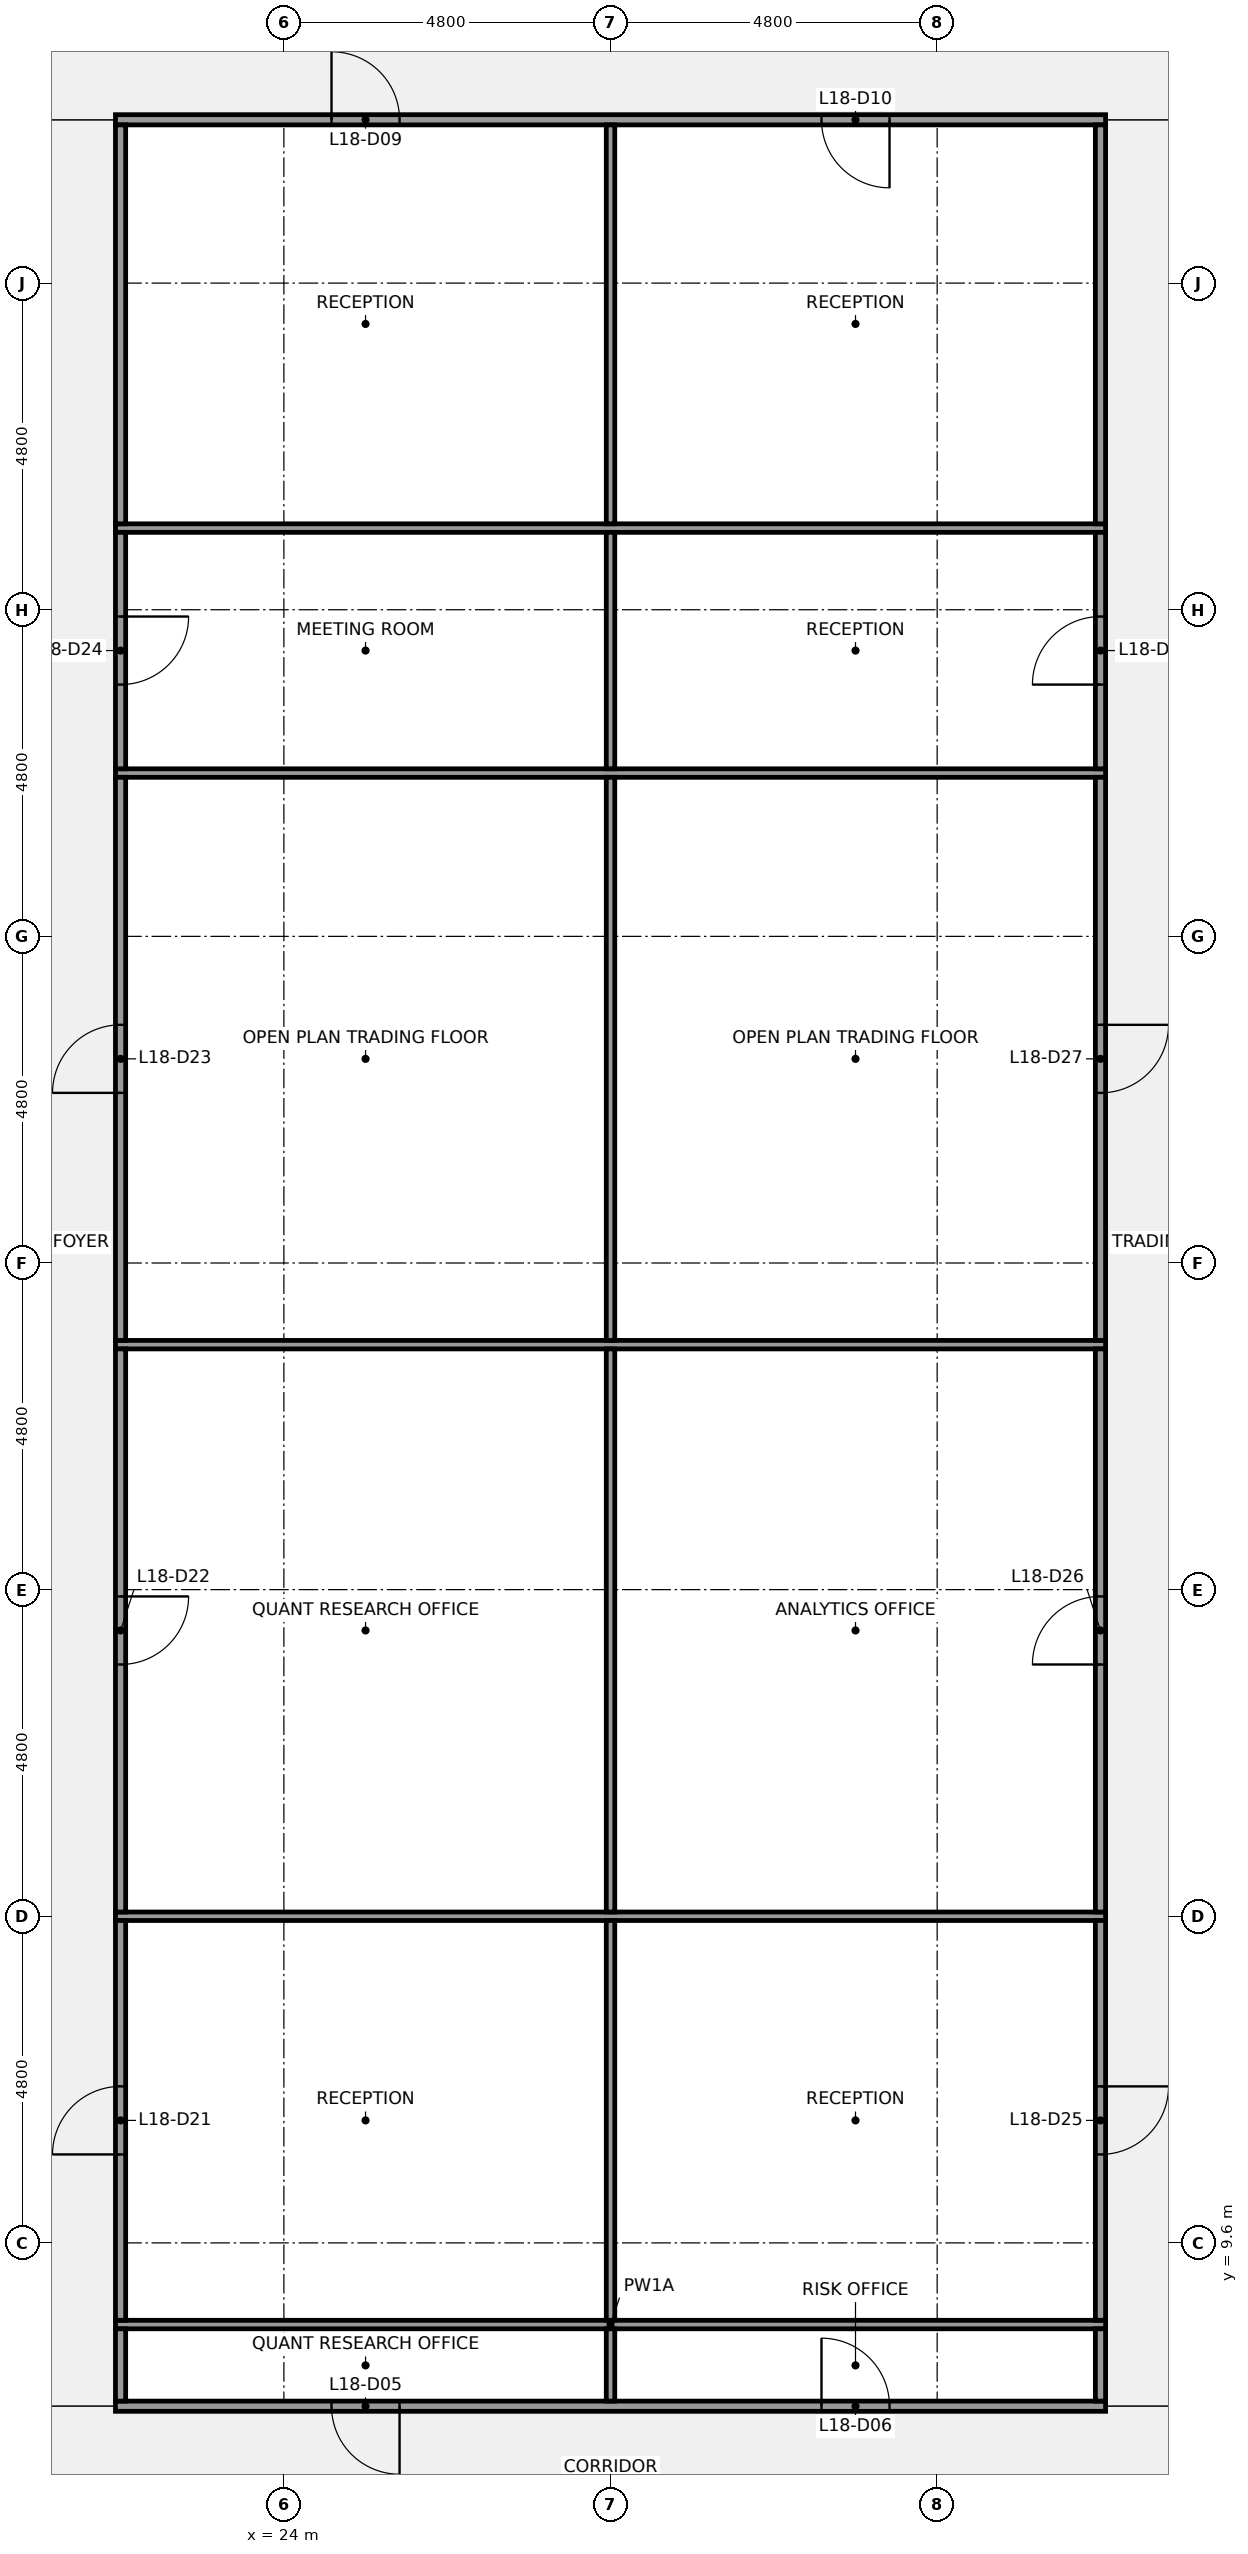
"""IFC4 building model, lengths in metres.
Left out: names, types, materials, properties, quantities, classifications, styles, units other than length and angle.
Written with IfcOpenShell. Run it as: python <this file> out.ifc"""

import sys

from ifc_helpers import new_model, si_unit, direction, frame, frame_2d, origin, place, context, subcontext, project, spatial, rectangle, extrude, element, fill, save


model = new_model("IFC4")
c1 = context("Model", 3, precision=1e-05, world=origin(), true_north=direction((0.0, 1.0)))
c2 = subcontext(c1, "Body", "Model", "MODEL_VIEW")
j1 = project(units=[si_unit("LENGTHUNIT", "METRE"), si_unit("PLANEANGLEUNIT", "RADIAN")], contexts=[c1])
p1 = place(None, origin())
s1 = spatial("IfcSite", under=j1, at=p1, CompositionType="ELEMENT")
p2 = place(p1, origin())
s2 = spatial("IfcBuilding", under=s1, at=p2, CompositionType="ELEMENT")
p3 = place(p2, frame((0.0, 0.0, 83.0)))
s3 = spatial("IfcBuildingStorey", under=s2, at=p3, CompositionType="ELEMENT", Elevation=83.0)
p4 = place(p3, frame((21.525, 7.2, 0.0), z_axis=(0.0, 0.0, 1.0), x_axis=(1.0, 0.0, 0.0)))
e1 = element("IfcWall", 1, at=p4, inside=s3, PredefinedType="PARTITIONING", context=c2, shape_type="SweptSolid", body=[
    extrude(rectangle(XDim=14.55, YDim=0.15, at=frame_2d((7.275, 0.0))), origin(), (0.0, 0.0, 1.0), 2.709),
])
p5 = place(p4, frame((3.175, 0.0, 0.0)))
e2 = element("IfcOpeningElement", 2, at=p5, cuts=e1, PredefinedType="OPENING", context=c2, shape_type="SweptSolid", body=[
    extrude(rectangle(XDim=1.0, YDim=2.1, at=frame_2d((0.5, 1.05))), frame((0.0, 0.085, 0.0), z_axis=(0.0, -1.0, 0.0), x_axis=(1.0, 0.0, 0.0)), (0.0, 0.0, 1.0), 0.17),
])
p6 = place(p4, frame((10.375, 0.0, 0.0)))
e3 = element("IfcOpeningElement", 3, at=p6, cuts=e1, PredefinedType="OPENING", context=c2, shape_type="SweptSolid", body=[
    extrude(rectangle(XDim=1.0, YDim=2.1, at=frame_2d((0.5, 1.05))), frame((0.0, 0.085, 0.0), z_axis=(0.0, -1.0, 0.0), x_axis=(1.0, 0.0, 0.0)), (0.0, 0.0, 1.0), 0.17),
])
for number, where, z_axis, x_axis in (
    (4, (21.525, 8.4, 0.0), (0.0, 0.0, 1.0), (1.0, 0.0, 0.0)),
    (5, (21.525, 14.4, 0.0), (0.0, 0.0, 1.0), (1.0, 0.0, 0.0)),
    (6, (21.525, 22.8, 0.0), (0.0, 0.0, 1.0), (1.0, 0.0, 0.0)),
    (7, (21.525, 31.2, 0.0), (0.0, 0.0, 1.0), (1.0, 0.0, 0.0)),
    (8, (21.525, 34.8, 0.0), (0.0, 0.0, 1.0), (1.0, 0.0, 0.0)),
):
    element("IfcWall", number, at=place(p3, frame(where, z_axis=z_axis, x_axis=x_axis)), inside=s3, PredefinedType="PARTITIONING", context=c2, shape_type="SweptSolid", body=[
        extrude(rectangle(XDim=14.55, YDim=0.125, at=frame_2d((7.275, 0.0))), origin(), (0.0, 0.0, 1.0), 2.709),
    ])
p7 = place(p3, frame((21.525, 40.8, 0.0), z_axis=(0.0, 0.0, 1.0), x_axis=(1.0, 0.0, 0.0)))
e9 = element("IfcWall", 9, at=p7, inside=s3, PredefinedType="PARTITIONING", context=c2, shape_type="SweptSolid", body=[
    extrude(rectangle(XDim=14.55, YDim=0.15, at=frame_2d((7.275, 0.0))), origin(), (0.0, 0.0, 1.0), 2.709),
])
p8 = place(p7, frame((3.175, 0.0, 0.0)))
e10 = element("IfcOpeningElement", 10, at=p8, cuts=e9, PredefinedType="OPENING", context=c2, shape_type="SweptSolid", body=[
    extrude(rectangle(XDim=1.0, YDim=2.1, at=frame_2d((0.5, 1.05))), frame((0.0, 0.085, 0.0), z_axis=(0.0, -1.0, 0.0), x_axis=(1.0, 0.0, 0.0)), (0.0, 0.0, 1.0), 0.17),
])
p9 = place(p7, frame((10.375, 0.0, 0.0)))
e11 = element("IfcOpeningElement", 11, at=p9, cuts=e9, PredefinedType="OPENING", context=c2, shape_type="SweptSolid", body=[
    extrude(rectangle(XDim=1.0, YDim=2.1, at=frame_2d((0.5, 1.05))), frame((0.0, 0.085, 0.0), z_axis=(0.0, -1.0, 0.0), x_axis=(1.0, 0.0, 0.0)), (0.0, 0.0, 1.0), 0.17),
])
p10 = place(p3, frame((21.6, 7.275, 0.0), z_axis=(0.0, 0.0, 1.0), x_axis=(0.0, 1.0, 0.0)))
e12 = element("IfcWall", 12, at=p10, inside=s3, PredefinedType="PARTITIONING", context=c2, shape_type="SweptSolid", body=[
    extrude(rectangle(XDim=1.062, YDim=0.15, at=frame_2d((0.531, 0.0))), origin(), (0.0, 0.0, 1.0), 2.709),
])
p11 = place(p3, frame((21.6, 8.462, 0.0), z_axis=(0.0, 0.0, 1.0), x_axis=(0.0, 1.0, 0.0)))
e13 = element("IfcWall", 13, at=p11, inside=s3, PredefinedType="PARTITIONING", context=c2, shape_type="SweptSolid", body=[
    extrude(rectangle(XDim=5.875, YDim=0.15, at=frame_2d((2.938, 0.0))), origin(), (0.0, 0.0, 1.0), 2.709),
])
p12 = place(p11, frame((2.438, 0.0, 0.0)))
e14 = element("IfcOpeningElement", 14, at=p12, cuts=e13, PredefinedType="OPENING", context=c2, shape_type="SweptSolid", body=[
    extrude(rectangle(XDim=1.0, YDim=2.1, at=frame_2d((0.5, 1.05))), frame((0.0, 0.085, 0.0), z_axis=(0.0, -1.0, 0.0), x_axis=(1.0, 0.0, 0.0)), (0.0, 0.0, 1.0), 0.17),
])
p13 = place(p3, frame((21.6, 14.462, 0.0), z_axis=(0.0, 0.0, 1.0), x_axis=(0.0, 1.0, 0.0)))
e15 = element("IfcWall", 15, at=p13, inside=s3, PredefinedType="PARTITIONING", context=c2, shape_type="SweptSolid", body=[
    extrude(rectangle(XDim=8.275, YDim=0.15, at=frame_2d((4.138, 0.0))), origin(), (0.0, 0.0, 1.0), 2.709),
])
p14 = place(p13, frame((3.637, 0.0, 0.0)))
e16 = element("IfcOpeningElement", 16, at=p14, cuts=e15, PredefinedType="OPENING", context=c2, shape_type="SweptSolid", body=[
    extrude(rectangle(XDim=1.0, YDim=2.1, at=frame_2d((0.5, 1.05))), frame((0.0, 0.085, 0.0), z_axis=(0.0, -1.0, 0.0), x_axis=(1.0, 0.0, 0.0)), (0.0, 0.0, 1.0), 0.17),
])
p15 = place(p3, frame((21.6, 22.863, 0.0), z_axis=(0.0, 0.0, 1.0), x_axis=(0.0, 1.0, 0.0)))
e17 = element("IfcWall", 17, at=p15, inside=s3, PredefinedType="PARTITIONING", context=c2, shape_type="SweptSolid", body=[
    extrude(rectangle(XDim=8.275, YDim=0.15, at=frame_2d((4.137, 0.0))), origin(), (0.0, 0.0, 1.0), 2.709),
])
p16 = place(p15, frame((3.637, 0.0, 0.0)))
e18 = element("IfcOpeningElement", 18, at=p16, cuts=e17, PredefinedType="OPENING", context=c2, shape_type="SweptSolid", body=[
    extrude(rectangle(XDim=1.0, YDim=2.1, at=frame_2d((0.5, 1.05))), frame((0.0, 0.085, 0.0), z_axis=(0.0, -1.0, 0.0), x_axis=(1.0, 0.0, 0.0)), (0.0, 0.0, 1.0), 0.17),
])
p17 = place(p3, frame((21.6, 31.262, 0.0), z_axis=(0.0, 0.0, 1.0), x_axis=(0.0, 1.0, 0.0)))
e19 = element("IfcWall", 19, at=p17, inside=s3, PredefinedType="PARTITIONING", context=c2, shape_type="SweptSolid", body=[
    extrude(rectangle(XDim=3.475, YDim=0.15, at=frame_2d((1.738, 0.0))), origin(), (0.0, 0.0, 1.0), 2.709),
])
p18 = place(p17, frame((1.238, 0.0, 0.0)))
e20 = element("IfcOpeningElement", 20, at=p18, cuts=e19, PredefinedType="OPENING", context=c2, shape_type="SweptSolid", body=[
    extrude(rectangle(XDim=1.0, YDim=2.1, at=frame_2d((0.5, 1.05))), frame((0.0, 0.085, 0.0), z_axis=(0.0, -1.0, 0.0), x_axis=(1.0, 0.0, 0.0)), (0.0, 0.0, 1.0), 0.17),
])
p19 = place(p3, frame((21.6, 34.863, 0.0), z_axis=(0.0, 0.0, 1.0), x_axis=(0.0, 1.0, 0.0)))
e21 = element("IfcWall", 21, at=p19, inside=s3, PredefinedType="PARTITIONING", context=c2, shape_type="SweptSolid", body=[
    extrude(rectangle(XDim=5.863, YDim=0.15, at=frame_2d((2.931, 0.0))), origin(), (0.0, 0.0, 1.0), 2.709),
])
p20 = place(p3, frame((28.8, 7.275, 0.0), z_axis=(0.0, 0.0, 1.0), x_axis=(0.0, 1.0, 0.0)))
e22 = element("IfcWall", 22, at=p20, inside=s3, PredefinedType="PARTITIONING", context=c2, shape_type="SweptSolid", body=[
    extrude(rectangle(XDim=1.062, YDim=0.125, at=frame_2d((0.531, 0.0))), origin(), (0.0, 0.0, 1.0), 2.709),
])
p21 = place(p3, frame((28.8, 8.462, 0.0), z_axis=(0.0, 0.0, 1.0), x_axis=(0.0, 1.0, 0.0)))
e23 = element("IfcWall", 23, at=p21, inside=s3, PredefinedType="PARTITIONING", context=c2, shape_type="SweptSolid", body=[
    extrude(rectangle(XDim=5.875, YDim=0.125, at=frame_2d((2.938, 0.0))), origin(), (0.0, 0.0, 1.0), 2.709),
])
p22 = place(p3, frame((28.8, 14.462, 0.0), z_axis=(0.0, 0.0, 1.0), x_axis=(0.0, 1.0, 0.0)))
e24 = element("IfcWall", 24, at=p22, inside=s3, PredefinedType="PARTITIONING", context=c2, shape_type="SweptSolid", body=[
    extrude(rectangle(XDim=8.275, YDim=0.125, at=frame_2d((4.138, 0.0))), origin(), (0.0, 0.0, 1.0), 2.709),
])
p23 = place(p3, frame((28.8, 22.863, 0.0), z_axis=(0.0, 0.0, 1.0), x_axis=(0.0, 1.0, 0.0)))
e25 = element("IfcWall", 25, at=p23, inside=s3, PredefinedType="PARTITIONING", context=c2, shape_type="SweptSolid", body=[
    extrude(rectangle(XDim=8.275, YDim=0.125, at=frame_2d((4.137, 0.0))), origin(), (0.0, 0.0, 1.0), 2.709),
])
p24 = place(p3, frame((28.8, 31.262, 0.0), z_axis=(0.0, 0.0, 1.0), x_axis=(0.0, 1.0, 0.0)))
e26 = element("IfcWall", 26, at=p24, inside=s3, PredefinedType="PARTITIONING", context=c2, shape_type="SweptSolid", body=[
    extrude(rectangle(XDim=3.475, YDim=0.125, at=frame_2d((1.738, 0.0))), origin(), (0.0, 0.0, 1.0), 2.709),
])
p25 = place(p3, frame((28.8, 34.863, 0.0), z_axis=(0.0, 0.0, 1.0), x_axis=(0.0, 1.0, 0.0)))
e27 = element("IfcWall", 27, at=p25, inside=s3, PredefinedType="PARTITIONING", context=c2, shape_type="SweptSolid", body=[
    extrude(rectangle(XDim=5.863, YDim=0.125, at=frame_2d((2.931, 0.0))), origin(), (0.0, 0.0, 1.0), 2.709),
])
p26 = place(p3, frame((36.0, 7.275, 0.0), z_axis=(0.0, 0.0, 1.0), x_axis=(0.0, 1.0, 0.0)))
e28 = element("IfcWall", 28, at=p26, inside=s3, PredefinedType="PARTITIONING", context=c2, shape_type="SweptSolid", body=[
    extrude(rectangle(XDim=1.062, YDim=0.15, at=frame_2d((0.531, 0.0))), origin(), (0.0, 0.0, 1.0), 2.709),
])
p27 = place(p3, frame((36.0, 8.462, 0.0), z_axis=(0.0, 0.0, 1.0), x_axis=(0.0, 1.0, 0.0)))
e29 = element("IfcWall", 29, at=p27, inside=s3, PredefinedType="PARTITIONING", context=c2, shape_type="SweptSolid", body=[
    extrude(rectangle(XDim=5.875, YDim=0.15, at=frame_2d((2.938, 0.0))), origin(), (0.0, 0.0, 1.0), 2.709),
])
p28 = place(p27, frame((2.438, 0.0, 0.0)))
e30 = element("IfcOpeningElement", 30, at=p28, cuts=e29, PredefinedType="OPENING", context=c2, shape_type="SweptSolid", body=[
    extrude(rectangle(XDim=1.0, YDim=2.1, at=frame_2d((0.5, 1.05))), frame((0.0, 0.085, 0.0), z_axis=(0.0, -1.0, 0.0), x_axis=(1.0, 0.0, 0.0)), (0.0, 0.0, 1.0), 0.17),
])
p29 = place(p3, frame((36.0, 14.462, 0.0), z_axis=(0.0, 0.0, 1.0), x_axis=(0.0, 1.0, 0.0)))
e31 = element("IfcWall", 31, at=p29, inside=s3, PredefinedType="PARTITIONING", context=c2, shape_type="SweptSolid", body=[
    extrude(rectangle(XDim=8.275, YDim=0.15, at=frame_2d((4.138, 0.0))), origin(), (0.0, 0.0, 1.0), 2.709),
])
p30 = place(p29, frame((3.637, 0.0, 0.0)))
e32 = element("IfcOpeningElement", 32, at=p30, cuts=e31, PredefinedType="OPENING", context=c2, shape_type="SweptSolid", body=[
    extrude(rectangle(XDim=1.0, YDim=2.1, at=frame_2d((0.5, 1.05))), frame((0.0, 0.085, 0.0), z_axis=(0.0, -1.0, 0.0), x_axis=(1.0, 0.0, 0.0)), (0.0, 0.0, 1.0), 0.17),
])
p31 = place(p3, frame((36.0, 22.863, 0.0), z_axis=(0.0, 0.0, 1.0), x_axis=(0.0, 1.0, 0.0)))
e33 = element("IfcWall", 33, at=p31, inside=s3, PredefinedType="PARTITIONING", context=c2, shape_type="SweptSolid", body=[
    extrude(rectangle(XDim=8.275, YDim=0.15, at=frame_2d((4.137, 0.0))), origin(), (0.0, 0.0, 1.0), 2.709),
])
p32 = place(p31, frame((3.637, 0.0, 0.0)))
e34 = element("IfcOpeningElement", 34, at=p32, cuts=e33, PredefinedType="OPENING", context=c2, shape_type="SweptSolid", body=[
    extrude(rectangle(XDim=1.0, YDim=2.1, at=frame_2d((0.5, 1.05))), frame((0.0, 0.085, 0.0), z_axis=(0.0, -1.0, 0.0), x_axis=(1.0, 0.0, 0.0)), (0.0, 0.0, 1.0), 0.17),
])
p33 = place(p3, frame((36.0, 31.262, 0.0), z_axis=(0.0, 0.0, 1.0), x_axis=(0.0, 1.0, 0.0)))
e35 = element("IfcWall", 35, at=p33, inside=s3, PredefinedType="PARTITIONING", context=c2, shape_type="SweptSolid", body=[
    extrude(rectangle(XDim=3.475, YDim=0.15, at=frame_2d((1.738, 0.0))), origin(), (0.0, 0.0, 1.0), 2.709),
])
p34 = place(p33, frame((1.238, 0.0, 0.0)))
e36 = element("IfcOpeningElement", 36, at=p34, cuts=e35, PredefinedType="OPENING", context=c2, shape_type="SweptSolid", body=[
    extrude(rectangle(XDim=1.0, YDim=2.1, at=frame_2d((0.5, 1.05))), frame((0.0, 0.085, 0.0), z_axis=(0.0, -1.0, 0.0), x_axis=(1.0, 0.0, 0.0)), (0.0, 0.0, 1.0), 0.17),
])
p35 = place(p3, frame((36.0, 34.863, 0.0), z_axis=(0.0, 0.0, 1.0), x_axis=(0.0, 1.0, 0.0)))
e37 = element("IfcWall", 37, at=p35, inside=s3, PredefinedType="PARTITIONING", context=c2, shape_type="SweptSolid", body=[
    extrude(rectangle(XDim=5.863, YDim=0.15, at=frame_2d((2.931, 0.0))), origin(), (0.0, 0.0, 1.0), 2.709),
])
p36 = place(p5, origin())
e38 = element("IfcDoor", 38, at=p36, inside=s3, OperationType="SINGLE_SWING_RIGHT", PredefinedType="DOOR", context=c2, shape_type="SweptSolid", body=[
    extrude(rectangle(XDim=1.0, YDim=2.1, at=frame_2d((0.5, 1.05))), frame((0.0, 0.025, 0.0), z_axis=(0.0, -1.0, 0.0), x_axis=(1.0, 0.0, 0.0)), (0.0, 0.0, 1.0), 0.05),
])
fill(e2, e38)
p37 = place(p6, origin())
e39 = element("IfcDoor", 39, at=p37, inside=s3, OperationType="SINGLE_SWING_LEFT", PredefinedType="DOOR", context=c2, shape_type="SweptSolid", body=[
    extrude(rectangle(XDim=1.0, YDim=2.1, at=frame_2d((0.5, 1.05))), frame((0.0, 0.025, 0.0), z_axis=(0.0, -1.0, 0.0), x_axis=(1.0, 0.0, 0.0)), (0.0, 0.0, 1.0), 0.05),
])
fill(e3, e39)
p38 = place(p8, origin())
e40 = element("IfcDoor", 40, at=p38, inside=s3, OperationType="SINGLE_SWING_LEFT", PredefinedType="DOOR", context=c2, shape_type="SweptSolid", body=[
    extrude(rectangle(XDim=1.0, YDim=2.1, at=frame_2d((0.5, 1.05))), frame((0.0, 0.025, 0.0), z_axis=(0.0, -1.0, 0.0), x_axis=(1.0, 0.0, 0.0)), (0.0, 0.0, 1.0), 0.05),
])
fill(e10, e40)
p39 = place(p9, origin())
e41 = element("IfcDoor", 41, at=p39, inside=s3, OperationType="SINGLE_SWING_RIGHT", PredefinedType="DOOR", context=c2, shape_type="SweptSolid", body=[
    extrude(rectangle(XDim=1.0, YDim=2.1, at=frame_2d((0.5, 1.05))), frame((0.0, 0.025, 0.0), z_axis=(0.0, -1.0, 0.0), x_axis=(1.0, 0.0, 0.0)), (0.0, 0.0, 1.0), 0.05),
])
fill(e11, e41)
p40 = place(p12, origin())
e42 = element("IfcDoor", 42, at=p40, inside=s3, OperationType="SINGLE_SWING_LEFT", PredefinedType="DOOR", context=c2, shape_type="SweptSolid", body=[
    extrude(rectangle(XDim=1.0, YDim=2.1, at=frame_2d((0.5, 1.05))), frame((0.0, 0.025, 0.0), z_axis=(0.0, -1.0, 0.0), x_axis=(1.0, 0.0, 0.0)), (0.0, 0.0, 1.0), 0.05),
])
fill(e14, e42)
p41 = place(p14, origin())
e43 = element("IfcDoor", 43, at=p41, inside=s3, OperationType="SINGLE_SWING_RIGHT", PredefinedType="DOOR", context=c2, shape_type="SweptSolid", body=[
    extrude(rectangle(XDim=1.0, YDim=2.1, at=frame_2d((0.5, 1.05))), frame((0.0, 0.025, 0.0), z_axis=(0.0, -1.0, 0.0), x_axis=(1.0, 0.0, 0.0)), (0.0, 0.0, 1.0), 0.05),
])
fill(e16, e43)
p42 = place(p16, origin())
e44 = element("IfcDoor", 44, at=p42, inside=s3, OperationType="SINGLE_SWING_LEFT", PredefinedType="DOOR", context=c2, shape_type="SweptSolid", body=[
    extrude(rectangle(XDim=1.0, YDim=2.1, at=frame_2d((0.5, 1.05))), frame((0.0, 0.025, 0.0), z_axis=(0.0, -1.0, 0.0), x_axis=(1.0, 0.0, 0.0)), (0.0, 0.0, 1.0), 0.05),
])
fill(e18, e44)
p43 = place(p18, origin())
e45 = element("IfcDoor", 45, at=p43, inside=s3, OperationType="SINGLE_SWING_RIGHT", PredefinedType="DOOR", context=c2, shape_type="SweptSolid", body=[
    extrude(rectangle(XDim=1.0, YDim=2.1, at=frame_2d((0.5, 1.05))), frame((0.0, 0.025, 0.0), z_axis=(0.0, -1.0, 0.0), x_axis=(1.0, 0.0, 0.0)), (0.0, 0.0, 1.0), 0.05),
])
fill(e20, e45)
p44 = place(p28, origin())
e46 = element("IfcDoor", 46, at=p44, inside=s3, OperationType="SINGLE_SWING_RIGHT", PredefinedType="DOOR", context=c2, shape_type="SweptSolid", body=[
    extrude(rectangle(XDim=1.0, YDim=2.1, at=frame_2d((0.5, 1.05))), frame((0.0, 0.025, 0.0), z_axis=(0.0, -1.0, 0.0), x_axis=(1.0, 0.0, 0.0)), (0.0, 0.0, 1.0), 0.05),
])
fill(e30, e46)
p45 = place(p30, origin())
e47 = element("IfcDoor", 47, at=p45, inside=s3, OperationType="SINGLE_SWING_LEFT", PredefinedType="DOOR", context=c2, shape_type="SweptSolid", body=[
    extrude(rectangle(XDim=1.0, YDim=2.1, at=frame_2d((0.5, 1.05))), frame((0.0, 0.025, 0.0), z_axis=(0.0, -1.0, 0.0), x_axis=(1.0, 0.0, 0.0)), (0.0, 0.0, 1.0), 0.05),
])
fill(e32, e47)
p46 = place(p32, origin())
e48 = element("IfcDoor", 48, at=p46, inside=s3, OperationType="SINGLE_SWING_RIGHT", PredefinedType="DOOR", context=c2, shape_type="SweptSolid", body=[
    extrude(rectangle(XDim=1.0, YDim=2.1, at=frame_2d((0.5, 1.05))), frame((0.0, 0.025, 0.0), z_axis=(0.0, -1.0, 0.0), x_axis=(1.0, 0.0, 0.0)), (0.0, 0.0, 1.0), 0.05),
])
fill(e34, e48)
p47 = place(p34, origin())
e49 = element("IfcDoor", 49, at=p47, inside=s3, OperationType="SINGLE_SWING_LEFT", PredefinedType="DOOR", context=c2, shape_type="SweptSolid", body=[
    extrude(rectangle(XDim=1.0, YDim=2.1, at=frame_2d((0.5, 1.05))), frame((0.0, 0.025, 0.0), z_axis=(0.0, -1.0, 0.0), x_axis=(1.0, 0.0, 0.0)), (0.0, 0.0, 1.0), 0.05),
])
fill(e36, e49)
save(model, sys.argv[1])
